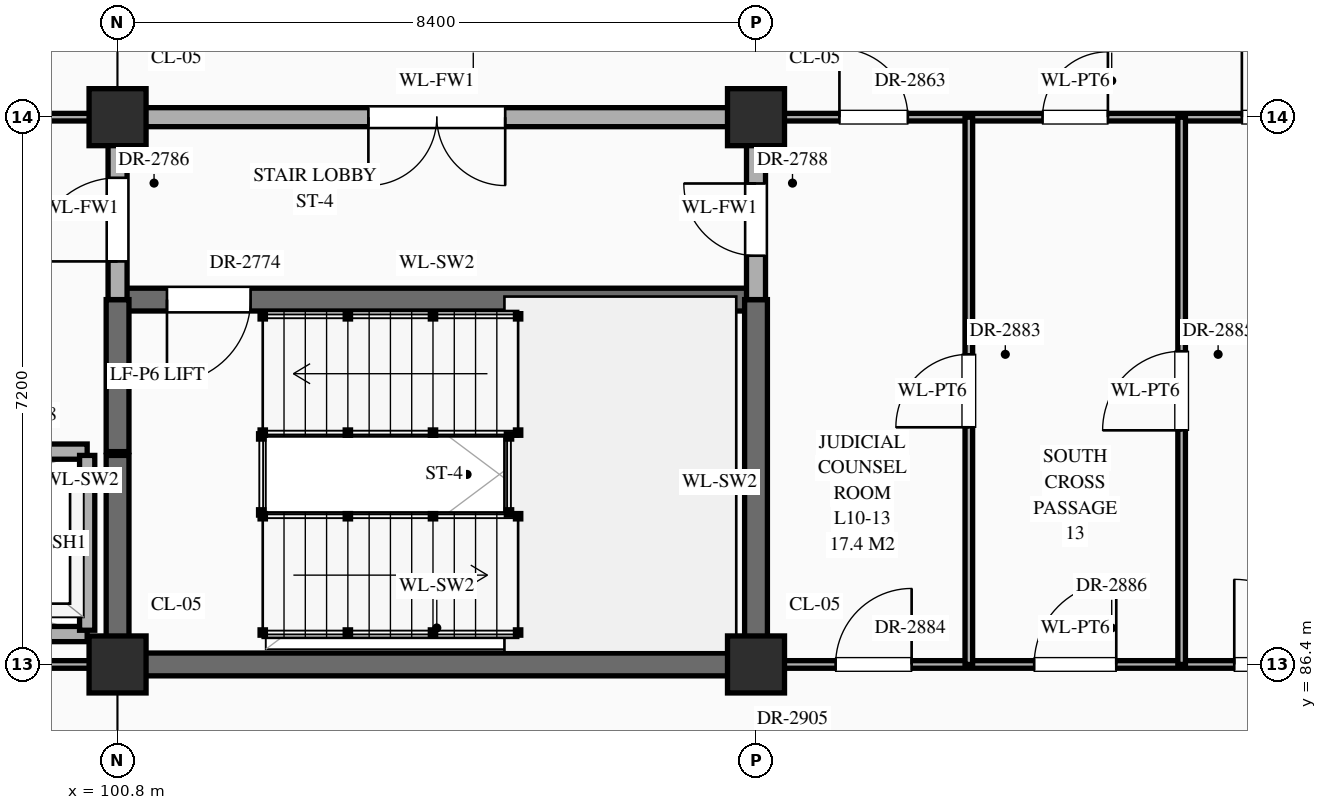
"""IFC4 building model, lengths in metres.
Left out: names, types, materials, properties, quantities, classifications, styles, units other than length and angle.
Written with IfcOpenShell. Run it as: python <this file> out.ifc"""

import sys

from ifc_helpers import new_model, si_unit, direction, frame, frame_2d, origin, origin_2d, place, context, subcontext, project, spatial, rectangle, extrude, element, fill, save


model = new_model("IFC4")
c1 = context("Model", 3, precision=1e-05, world=origin(), true_north=direction((0.0, 1.0)))
c2 = subcontext(c1, "Body", "Model", "MODEL_VIEW")
j1 = project(units=[si_unit("LENGTHUNIT", "METRE"), si_unit("PLANEANGLEUNIT", "RADIAN")], contexts=[c1])
p1 = place(None, origin())
s1 = spatial("IfcSite", under=j1, at=p1, CompositionType="ELEMENT")
p2 = place(p1, origin())
s2 = spatial("IfcBuilding", under=s1, at=p2, CompositionType="ELEMENT")
p3 = place(p2, frame((0.0, 0.0, 43.5)))
s3 = spatial("IfcBuildingStorey", under=s2, at=p3, CompositionType="ELEMENT", Elevation=43.5)
for number, where, z_axis, x_axis in (
    (1, (100.8, 86.4, 0.0), (0.0, 0.0, 1.0), (1.0, 0.0, 0.0)),
    (2, (100.8, 93.6, 0.0), (0.0, 0.0, 1.0), (1.0, 0.0, 0.0)),
    (3, (109.2, 86.4, 0.0), (0.0, 0.0, 1.0), (1.0, 0.0, 0.0)),
    (4, (109.2, 93.6, 0.0), (0.0, 0.0, 1.0), (1.0, 0.0, 0.0)),
):
    element("IfcColumn", number, at=place(p3, frame(where, z_axis=z_axis, x_axis=x_axis)), inside=s3, PredefinedType="COLUMN", context=c2, shape_type="SweptSolid", body=[
        extrude(rectangle(XDim=0.75, YDim=0.75, at=origin_2d()), origin(), (0.0, 0.0, 1.0), 4.2),
    ])
p4 = place(p3, frame((92.45, 86.4, 0.0), z_axis=(0.0, 0.0, 1.0), x_axis=(1.0, 0.0, 0.0)))
e5 = element("IfcWall", 5, at=p4, inside=s3, PredefinedType="STANDARD", context=c2, shape_type="SweptSolid", body=[
    extrude(rectangle(XDim=8.3, YDim=0.1, at=frame_2d((4.15, 0.0))), origin(), (0.0, 0.0, 1.0), 3.1),
])
p5 = place(p3, frame((100.8, 86.4, 0.0), z_axis=(0.0, 0.0, 1.0), x_axis=(1.0, 0.0, 0.0)))
e6 = element("IfcWall", 6, at=p5, inside=s3, PredefinedType="SHEAR", context=c2, shape_type="SweptSolid", body=[
    extrude(rectangle(XDim=8.4, YDim=0.3, at=frame_2d((4.2, 0.0))), origin(), (0.0, 0.0, 1.0), 3.95),
])
p6 = place(p3, frame((109.2, 86.4, 0.0), z_axis=(0.0, 0.0, 1.0), x_axis=(1.0, 0.0, 0.0)))
e7 = element("IfcWall", 7, at=p6, inside=s3, PredefinedType="STANDARD", context=c2, shape_type="SweptSolid", body=[
    extrude(rectangle(XDim=8.4, YDim=0.1, at=frame_2d((4.2, 0.0))), origin(), (0.0, 0.0, 1.0), 3.1),
])
p7 = place(p6, frame((1.048, 0.0, 0.0)))
e8 = element("IfcOpeningElement", 8, at=p7, cuts=e7, PredefinedType="OPENING", context=c2, shape_type="SweptSolid", body=[
    extrude(rectangle(XDim=1.0, YDim=2.25, at=frame_2d((0.5, 1.125))), frame((0.0, 0.062, 0.0), z_axis=(0.0, -1.0, 0.0), x_axis=(1.0, 0.0, 0.0)), (0.0, 0.0, 1.0), 0.124),
])
p8 = place(p6, frame((3.66, 0.0, 0.0)))
e9 = element("IfcOpeningElement", 9, at=p8, cuts=e7, PredefinedType="OPENING", context=c2, shape_type="SweptSolid", body=[
    extrude(rectangle(XDim=1.08, YDim=2.25, at=frame_2d((0.54, 1.125))), frame((0.0, 0.062, 0.0), z_axis=(0.0, -1.0, 0.0), x_axis=(1.0, 0.0, 0.0)), (0.0, 0.0, 1.0), 0.124),
])
p9 = place(p6, frame((6.292, 0.0, 0.0)))
e10 = element("IfcOpeningElement", 10, at=p9, cuts=e7, PredefinedType="OPENING", context=c2, shape_type="SweptSolid", body=[
    extrude(rectangle(XDim=1.12, YDim=2.25, at=frame_2d((0.56, 1.125))), frame((0.0, 0.062, 0.0), z_axis=(0.0, -1.0, 0.0), x_axis=(1.0, 0.0, 0.0)), (0.0, 0.0, 1.0), 0.124),
])
p10 = place(p3, frame((97.9, 86.8, 0.0), z_axis=(0.0, 0.0, 1.0), x_axis=(1.0, 0.0, 0.0)))
e11 = element("IfcWall", 11, at=p10, inside=s3, PredefinedType="STANDARD", context=c2, shape_type="SweptSolid", body=[
    extrude(rectangle(XDim=2.5, YDim=0.2, at=frame_2d((1.25, 0.0))), origin(), (0.0, 0.0, 1.0), 3.95),
])
p11 = place(p3, frame((92.7, 89.2, 0.0), z_axis=(0.0, 0.0, 1.0), x_axis=(1.0, 0.0, 0.0)))
e12 = element("IfcWall", 12, at=p11, inside=s3, PredefinedType="STANDARD", context=c2, shape_type="SweptSolid", body=[
    extrude(rectangle(XDim=7.7, YDim=0.2, at=frame_2d((3.85, 0.0))), origin(), (0.0, 0.0, 1.0), 3.95),
])
p12 = place(p11, frame((0.725, 0.0, 0.0)))
e13 = element("IfcOpeningElement", 13, at=p12, cuts=e12, PredefinedType="OPENING", context=c2, shape_type="SweptSolid", body=[
    extrude(rectangle(XDim=1.1, YDim=2.15, at=frame_2d((0.55, 1.075))), frame((0.0, 0.112, 0.0), z_axis=(0.0, -1.0, 0.0), x_axis=(1.0, 0.0, 0.0)), (0.0, 0.0, 1.0), 0.224),
])
p13 = place(p11, frame((3.3, 0.0, 0.0)))
e14 = element("IfcOpeningElement", 14, at=p13, cuts=e12, PredefinedType="OPENING", context=c2, shape_type="SweptSolid", body=[
    extrude(rectangle(XDim=1.1, YDim=2.15, at=frame_2d((0.55, 1.075))), frame((0.0, 0.112, 0.0), z_axis=(0.0, -1.0, 0.0), x_axis=(1.0, 0.0, 0.0)), (0.0, 0.0, 1.0), 0.224),
])
p14 = place(p11, frame((5.875, 0.0, 0.0)))
e15 = element("IfcOpeningElement", 15, at=p14, cuts=e12, PredefinedType="OPENING", context=c2, shape_type="SweptSolid", body=[
    extrude(rectangle(XDim=1.1, YDim=2.15, at=frame_2d((0.55, 1.075))), frame((0.0, 0.112, 0.0), z_axis=(0.0, -1.0, 0.0), x_axis=(1.0, 0.0, 0.0)), (0.0, 0.0, 1.0), 0.224),
])
p15 = place(p3, frame((100.8, 91.2, 0.0), z_axis=(0.0, 0.0, 1.0), x_axis=(1.0, 0.0, 0.0)))
e16 = element("IfcWall", 16, at=p15, inside=s3, PredefinedType="SHEAR", context=c2, shape_type="SweptSolid", body=[
    extrude(rectangle(XDim=8.4, YDim=0.3, at=frame_2d((4.2, 0.0))), origin(), (0.0, 0.0, 1.0), 3.95),
])
p16 = place(p15, frame((0.65, 0.0, 0.0)))
e17 = element("IfcOpeningElement", 17, at=p16, cuts=e16, PredefinedType="OPENING", context=c2, shape_type="SweptSolid", body=[
    extrude(rectangle(XDim=1.1, YDim=2.2, at=frame_2d((0.55, 1.1))), frame((0.0, 0.162, 0.0), z_axis=(0.0, -1.0, 0.0), x_axis=(1.0, 0.0, 0.0)), (0.0, 0.0, 1.0), 0.324),
])
p17 = place(p3, frame((67.2, 93.6, 0.0), z_axis=(0.0, 0.0, 1.0), x_axis=(1.0, 0.0, 0.0)))
e18 = element("IfcWall", 18, at=p17, inside=s3, PredefinedType="STANDARD", context=c2, shape_type="SweptSolid", body=[
    extrude(rectangle(XDim=33.6, YDim=0.1, at=frame_2d((16.8, 0.0))), origin(), (0.0, 0.0, 1.0), 3.1),
])
p18 = place(p17, frame((3.35, 0.0, 0.0)))
e19 = element("IfcOpeningElement", 19, at=p18, cuts=e18, PredefinedType="OPENING", context=c2, shape_type="SweptSolid", body=[
    extrude(rectangle(XDim=1.7, YDim=2.45, at=frame_2d((0.85, 1.225))), frame((0.0, 0.062, 0.0), z_axis=(0.0, -1.0, 0.0), x_axis=(1.0, 0.0, 0.0)), (0.0, 0.0, 1.0), 0.124),
])
p19 = place(p17, frame((28.675, 0.0, 0.0)))
e20 = element("IfcOpeningElement", 20, at=p19, cuts=e18, PredefinedType="OPENING", context=c2, shape_type="SweptSolid", body=[
    extrude(rectangle(XDim=1.45, YDim=2.3, at=frame_2d((0.725, 1.15))), frame((0.0, 0.062, 0.0), z_axis=(0.0, -1.0, 0.0), x_axis=(1.0, 0.0, 0.0)), (0.0, 0.0, 1.0), 0.124),
])
p20 = place(p17, frame((11.75, 0.0, 0.0)))
e21 = element("IfcOpeningElement", 21, at=p20, cuts=e18, PredefinedType="OPENING", context=c2, shape_type="SweptSolid", body=[
    extrude(rectangle(XDim=1.7, YDim=2.45, at=frame_2d((0.85, 1.225))), frame((0.0, 0.062, 0.0), z_axis=(0.0, -1.0, 0.0), x_axis=(1.0, 0.0, 0.0)), (0.0, 0.0, 1.0), 0.124),
])
p21 = place(p17, frame((17.837, 0.0, 0.0)))
e22 = element("IfcOpeningElement", 22, at=p21, cuts=e18, PredefinedType="OPENING", context=c2, shape_type="SweptSolid", body=[
    extrude(rectangle(XDim=1.02, YDim=2.4, at=frame_2d((0.51, 1.2))), frame((0.0, 0.062, 0.0), z_axis=(0.0, -1.0, 0.0), x_axis=(1.0, 0.0, 0.0)), (0.0, 0.0, 1.0), 0.124),
])
p22 = place(p17, frame((20.47, 0.0, 0.0)))
e23 = element("IfcOpeningElement", 23, at=p22, cuts=e18, PredefinedType="OPENING", context=c2, shape_type="SweptSolid", body=[
    extrude(rectangle(XDim=1.06, YDim=2.4, at=frame_2d((0.53, 1.2))), frame((0.0, 0.062, 0.0), z_axis=(0.0, -1.0, 0.0), x_axis=(1.0, 0.0, 0.0)), (0.0, 0.0, 1.0), 0.124),
])
p23 = place(p17, frame((23.083, 0.0, 0.0)))
e24 = element("IfcOpeningElement", 24, at=p23, cuts=e18, PredefinedType="OPENING", context=c2, shape_type="SweptSolid", body=[
    extrude(rectangle(XDim=1.14, YDim=2.4, at=frame_2d((0.57, 1.2))), frame((0.0, 0.062, 0.0), z_axis=(0.0, -1.0, 0.0), x_axis=(1.0, 0.0, 0.0)), (0.0, 0.0, 1.0), 0.124),
])
p24 = place(p3, frame((100.8, 93.6, 0.0), z_axis=(0.0, 0.0, 1.0), x_axis=(1.0, 0.0, 0.0)))
e25 = element("IfcWall", 25, at=p24, inside=s3, PredefinedType="STANDARD", context=c2, shape_type="SweptSolid", body=[
    extrude(rectangle(XDim=8.4, YDim=0.25, at=frame_2d((4.2, 0.0))), origin(), (0.0, 0.0, 1.0), 3.1),
])
p25 = place(p24, frame((3.3, 0.0, 0.0)))
e26 = element("IfcOpeningElement", 26, at=p25, cuts=e25, PredefinedType="OPENING", context=c2, shape_type="SweptSolid", body=[
    extrude(rectangle(XDim=1.8, YDim=2.35, at=frame_2d((0.9, 1.175))), frame((0.0, 0.137, 0.0), z_axis=(0.0, -1.0, 0.0), x_axis=(1.0, 0.0, 0.0)), (0.0, 0.0, 1.0), 0.274),
])
p26 = place(p3, frame((109.2, 93.6, 0.0), z_axis=(0.0, 0.0, 1.0), x_axis=(1.0, 0.0, 0.0)))
e27 = element("IfcWall", 27, at=p26, inside=s3, PredefinedType="STANDARD", context=c2, shape_type="SweptSolid", body=[
    extrude(rectangle(XDim=8.4, YDim=0.1, at=frame_2d((4.2, 0.0))), origin(), (0.0, 0.0, 1.0), 3.1),
])
p27 = place(p26, frame((1.097, 0.0, 0.0)))
e28 = element("IfcOpeningElement", 28, at=p27, cuts=e27, PredefinedType="OPENING", context=c2, shape_type="SweptSolid", body=[
    extrude(rectangle(XDim=0.9, YDim=2.15, at=frame_2d((0.45, 1.075))), frame((0.0, 0.062, 0.0), z_axis=(0.0, -1.0, 0.0), x_axis=(1.0, 0.0, 0.0)), (0.0, 0.0, 1.0), 0.124),
])
p28 = place(p26, frame((3.77, 0.0, 0.0)))
e29 = element("IfcOpeningElement", 29, at=p28, cuts=e27, PredefinedType="OPENING", context=c2, shape_type="SweptSolid", body=[
    extrude(rectangle(XDim=0.86, YDim=2.1, at=frame_2d((0.43, 1.05))), frame((0.0, 0.062, 0.0), z_axis=(0.0, -1.0, 0.0), x_axis=(1.0, 0.0, 0.0)), (0.0, 0.0, 1.0), 0.124),
])
p29 = place(p26, frame((6.393, 0.0, 0.0)))
e30 = element("IfcOpeningElement", 30, at=p29, cuts=e27, PredefinedType="OPENING", context=c2, shape_type="SweptSolid", body=[
    extrude(rectangle(XDim=0.92, YDim=2.15, at=frame_2d((0.46, 1.075))), frame((0.0, 0.062, 0.0), z_axis=(0.0, -1.0, 0.0), x_axis=(1.0, 0.0, 0.0)), (0.0, 0.0, 1.0), 0.124),
])
p30 = place(p3, frame((100.4, 86.85, 0.0), z_axis=(0.0, 0.0, 1.0), x_axis=(0.0, 1.0, 0.0)))
e31 = element("IfcWall", 31, at=p30, inside=s3, PredefinedType="STANDARD", context=c2, shape_type="SweptSolid", body=[
    extrude(rectangle(XDim=2.3, YDim=0.2, at=frame_2d((1.15, 0.0))), origin(), (0.0, 0.0, 1.0), 3.95),
])
p31 = place(p3, frame((100.8, 86.45, 0.0), z_axis=(0.0, 0.0, 1.0), x_axis=(0.0, 1.0, 0.0)))
e32 = element("IfcWall", 32, at=p31, inside=s3, PredefinedType="SHEAR", context=c2, shape_type="SweptSolid", body=[
    extrude(rectangle(XDim=2.7, YDim=0.3, at=frame_2d((1.35, 0.0))), origin(), (0.0, 0.0, 1.0), 3.95),
])
p32 = place(p3, frame((100.8, 89.2, 0.0), z_axis=(0.0, 0.0, 1.0), x_axis=(0.0, 1.0, 0.0)))
e33 = element("IfcWall", 33, at=p32, inside=s3, PredefinedType="SHEAR", context=c2, shape_type="SweptSolid", body=[
    extrude(rectangle(XDim=2.0, YDim=0.3, at=frame_2d((1.0, 0.0))), origin(), (0.0, 0.0, 1.0), 3.95),
])
p33 = place(p3, frame((100.8, 91.2, 0.0), z_axis=(0.0, 0.0, 1.0), x_axis=(0.0, 1.0, 0.0)))
e34 = element("IfcWall", 34, at=p33, inside=s3, PredefinedType="STANDARD", context=c2, shape_type="SweptSolid", body=[
    extrude(rectangle(XDim=2.4, YDim=0.25, at=frame_2d((1.2, 0.0))), origin(), (0.0, 0.0, 1.0), 3.2),
])
p34 = place(p33, frame((0.502, 0.0, 0.0)))
e35 = element("IfcOpeningElement", 35, at=p34, cuts=e34, PredefinedType="OPENING", context=c2, shape_type="SweptSolid", body=[
    extrude(rectangle(XDim=1.1, YDim=2.2, at=frame_2d((0.55, 1.1))), frame((0.0, 0.137, 0.0), z_axis=(0.0, -1.0, 0.0), x_axis=(1.0, 0.0, 0.0)), (0.0, 0.0, 1.0), 0.274),
])
p35 = place(p3, frame((109.2, 86.4, 0.0), z_axis=(0.0, 0.0, 1.0), x_axis=(0.0, 1.0, 0.0)))
e36 = element("IfcWall", 36, at=p35, inside=s3, PredefinedType="SHEAR", context=c2, shape_type="SweptSolid", body=[
    extrude(rectangle(XDim=4.8, YDim=0.3, at=frame_2d((2.4, 0.0))), origin(), (0.0, 0.0, 1.0), 3.95),
])
p36 = place(p3, frame((109.2, 91.2, 0.0), z_axis=(0.0, 0.0, 1.0), x_axis=(0.0, 1.0, 0.0)))
e37 = element("IfcWall", 37, at=p36, inside=s3, PredefinedType="STANDARD", context=c2, shape_type="SweptSolid", body=[
    extrude(rectangle(XDim=2.4, YDim=0.25, at=frame_2d((1.2, 0.0))), origin(), (0.0, 0.0, 1.0), 3.2),
])
p37 = place(p36, frame((0.577, 0.0, 0.0)))
e38 = element("IfcOpeningElement", 38, at=p37, cuts=e37, PredefinedType="OPENING", context=c2, shape_type="SweptSolid", body=[
    extrude(rectangle(XDim=0.95, YDim=2.15, at=frame_2d((0.475, 1.075))), frame((0.0, 0.137, 0.0), z_axis=(0.0, -1.0, 0.0), x_axis=(1.0, 0.0, 0.0)), (0.0, 0.0, 1.0), 0.274),
])
p38 = place(p3, frame((112.0, 86.4, 0.0), z_axis=(0.0, 0.0, 1.0), x_axis=(0.0, 1.0, 0.0)))
e39 = element("IfcWall", 39, at=p38, inside=s3, PredefinedType="STANDARD", context=c2, shape_type="SweptSolid", body=[
    extrude(rectangle(XDim=7.2, YDim=0.1, at=frame_2d((3.6, 0.0))), origin(), (0.0, 0.0, 1.0), 3.95),
])
p39 = place(p38, frame((3.12, 0.0, 0.0)))
e40 = element("IfcOpeningElement", 40, at=p39, cuts=e39, PredefinedType="OPENING", context=c2, shape_type="SweptSolid", body=[
    extrude(rectangle(XDim=0.96, YDim=2.2, at=frame_2d((0.48, 1.1))), frame((0.0, 0.062, 0.0), z_axis=(0.0, -1.0, 0.0), x_axis=(1.0, 0.0, 0.0)), (0.0, 0.0, 1.0), 0.124),
])
p40 = place(p3, frame((114.8, 86.4, 0.0), z_axis=(0.0, 0.0, 1.0), x_axis=(0.0, 1.0, 0.0)))
e41 = element("IfcWall", 41, at=p40, inside=s3, PredefinedType="STANDARD", context=c2, shape_type="SweptSolid", body=[
    extrude(rectangle(XDim=7.2, YDim=0.1, at=frame_2d((3.6, 0.0))), origin(), (0.0, 0.0, 1.0), 3.95),
])
p41 = place(p40, frame((3.08, 0.0, 0.0)))
e42 = element("IfcOpeningElement", 42, at=p41, cuts=e41, PredefinedType="OPENING", context=c2, shape_type="SweptSolid", body=[
    extrude(rectangle(XDim=1.04, YDim=2.2, at=frame_2d((0.52, 1.1))), frame((0.0, 0.062, 0.0), z_axis=(0.0, -1.0, 0.0), x_axis=(1.0, 0.0, 0.0)), (0.0, 0.0, 1.0), 0.124),
])
p42 = place(p16, frame((1.1, 0.0, 0.0), z_axis=(0.0, 0.0, 1.0), x_axis=(-1.0, 0.0, 0.0)))
e43 = element("IfcDoor", 43, at=p42, inside=s3, OperationType="SINGLE_SWING_RIGHT", PredefinedType="DOOR", context=c2, shape_type="SweptSolid", body=[
    extrude(rectangle(XDim=1.1, YDim=2.2, at=frame_2d((0.55, 1.1))), frame((0.0, 0.025, 0.0), z_axis=(0.0, -1.0, 0.0), x_axis=(1.0, 0.0, 0.0)), (0.0, 0.0, 1.0), 0.05),
])
fill(e17, e43)
p43 = place(p34, origin())
e44 = element("IfcDoor", 44, at=p43, inside=s3, OperationType="SINGLE_SWING_LEFT", PredefinedType="DOOR", context=c2, shape_type="SweptSolid", body=[
    extrude(rectangle(XDim=1.1, YDim=2.2, at=frame_2d((0.55, 1.1))), frame((0.0, 0.025, 0.0), z_axis=(0.0, -1.0, 0.0), x_axis=(1.0, 0.0, 0.0)), (0.0, 0.0, 1.0), 0.05),
])
fill(e35, e44)
p44 = place(p25, frame((1.8, 0.0, 0.0), z_axis=(0.0, 0.0, 1.0), x_axis=(-1.0, 0.0, 0.0)))
e45 = element("IfcDoor", 45, at=p44, inside=s3, OperationType="DOUBLE_DOOR_SINGLE_SWING", PredefinedType="DOOR", context=c2, shape_type="SweptSolid", body=[
    extrude(rectangle(XDim=1.8, YDim=2.35, at=frame_2d((0.9, 1.175))), frame((0.0, 0.025, 0.0), z_axis=(0.0, -1.0, 0.0), x_axis=(1.0, 0.0, 0.0)), (0.0, 0.0, 1.0), 0.05),
])
fill(e26, e45)
p45 = place(p37, origin())
e46 = element("IfcDoor", 46, at=p45, inside=s3, OperationType="SINGLE_SWING_RIGHT", PredefinedType="DOOR", context=c2, shape_type="SweptSolid", body=[
    extrude(rectangle(XDim=0.95, YDim=2.15, at=frame_2d((0.475, 1.075))), frame((0.0, 0.025, 0.0), z_axis=(0.0, -1.0, 0.0), x_axis=(1.0, 0.0, 0.0)), (0.0, 0.0, 1.0), 0.05),
])
fill(e38, e46)
p46 = place(p27, origin())
e47 = element("IfcDoor", 47, at=p46, inside=s3, OperationType="SINGLE_SWING_LEFT", PredefinedType="DOOR", context=c2, shape_type="SweptSolid", body=[
    extrude(rectangle(XDim=0.9, YDim=2.15, at=frame_2d((0.45, 1.075))), frame((0.0, 0.025, 0.0), z_axis=(0.0, -1.0, 0.0), x_axis=(1.0, 0.0, 0.0)), (0.0, 0.0, 1.0), 0.05),
])
fill(e28, e47)
p47 = place(p28, origin())
e48 = element("IfcDoor", 48, at=p47, inside=s3, OperationType="SINGLE_SWING_RIGHT", PredefinedType="DOOR", context=c2, shape_type="SweptSolid", body=[
    extrude(rectangle(XDim=0.86, YDim=2.1, at=frame_2d((0.43, 1.05))), frame((0.0, 0.025, 0.0), z_axis=(0.0, -1.0, 0.0), x_axis=(1.0, 0.0, 0.0)), (0.0, 0.0, 1.0), 0.05),
])
fill(e29, e48)
p48 = place(p29, origin())
e49 = element("IfcDoor", 49, at=p48, inside=s3, OperationType="SINGLE_SWING_LEFT", PredefinedType="DOOR", context=c2, shape_type="SweptSolid", body=[
    extrude(rectangle(XDim=0.92, YDim=2.15, at=frame_2d((0.46, 1.075))), frame((0.0, 0.025, 0.0), z_axis=(0.0, -1.0, 0.0), x_axis=(1.0, 0.0, 0.0)), (0.0, 0.0, 1.0), 0.05),
])
fill(e30, e49)
p49 = place(p39, origin())
e50 = element("IfcDoor", 50, at=p49, inside=s3, OperationType="SINGLE_SWING_LEFT", PredefinedType="DOOR", context=c2, shape_type="SweptSolid", body=[
    extrude(rectangle(XDim=0.96, YDim=2.2, at=frame_2d((0.48, 1.1))), frame((0.0, 0.025, 0.0), z_axis=(0.0, -1.0, 0.0), x_axis=(1.0, 0.0, 0.0)), (0.0, 0.0, 1.0), 0.05),
])
fill(e40, e50)
p50 = place(p7, origin())
e51 = element("IfcDoor", 51, at=p50, inside=s3, OperationType="SINGLE_SWING_RIGHT", PredefinedType="DOOR", context=c2, shape_type="SweptSolid", body=[
    extrude(rectangle(XDim=1.0, YDim=2.25, at=frame_2d((0.5, 1.125))), frame((0.0, 0.025, 0.0), z_axis=(0.0, -1.0, 0.0), x_axis=(1.0, 0.0, 0.0)), (0.0, 0.0, 1.0), 0.05),
])
fill(e8, e51)
p51 = place(p41, origin())
e52 = element("IfcDoor", 52, at=p51, inside=s3, OperationType="SINGLE_SWING_LEFT", PredefinedType="DOOR", context=c2, shape_type="SweptSolid", body=[
    extrude(rectangle(XDim=1.04, YDim=2.2, at=frame_2d((0.52, 1.1))), frame((0.0, 0.025, 0.0), z_axis=(0.0, -1.0, 0.0), x_axis=(1.0, 0.0, 0.0)), (0.0, 0.0, 1.0), 0.05),
])
fill(e42, e52)
p52 = place(p8, origin())
e53 = element("IfcDoor", 53, at=p52, inside=s3, OperationType="SINGLE_SWING_RIGHT", PredefinedType="DOOR", context=c2, shape_type="SweptSolid", body=[
    extrude(rectangle(XDim=1.08, YDim=2.25, at=frame_2d((0.54, 1.125))), frame((0.0, 0.025, 0.0), z_axis=(0.0, -1.0, 0.0), x_axis=(1.0, 0.0, 0.0)), (0.0, 0.0, 1.0), 0.05),
])
fill(e9, e53)
p53 = place(p9, origin())
e54 = element("IfcDoor", 54, at=p53, inside=s3, OperationType="SINGLE_SWING_LEFT", PredefinedType="DOOR", context=c2, shape_type="SweptSolid", body=[
    extrude(rectangle(XDim=1.12, YDim=2.25, at=frame_2d((0.56, 1.125))), frame((0.0, 0.025, 0.0), z_axis=(0.0, -1.0, 0.0), x_axis=(1.0, 0.0, 0.0)), (0.0, 0.0, 1.0), 0.05),
])
fill(e10, e54)
save(model, sys.argv[1])
